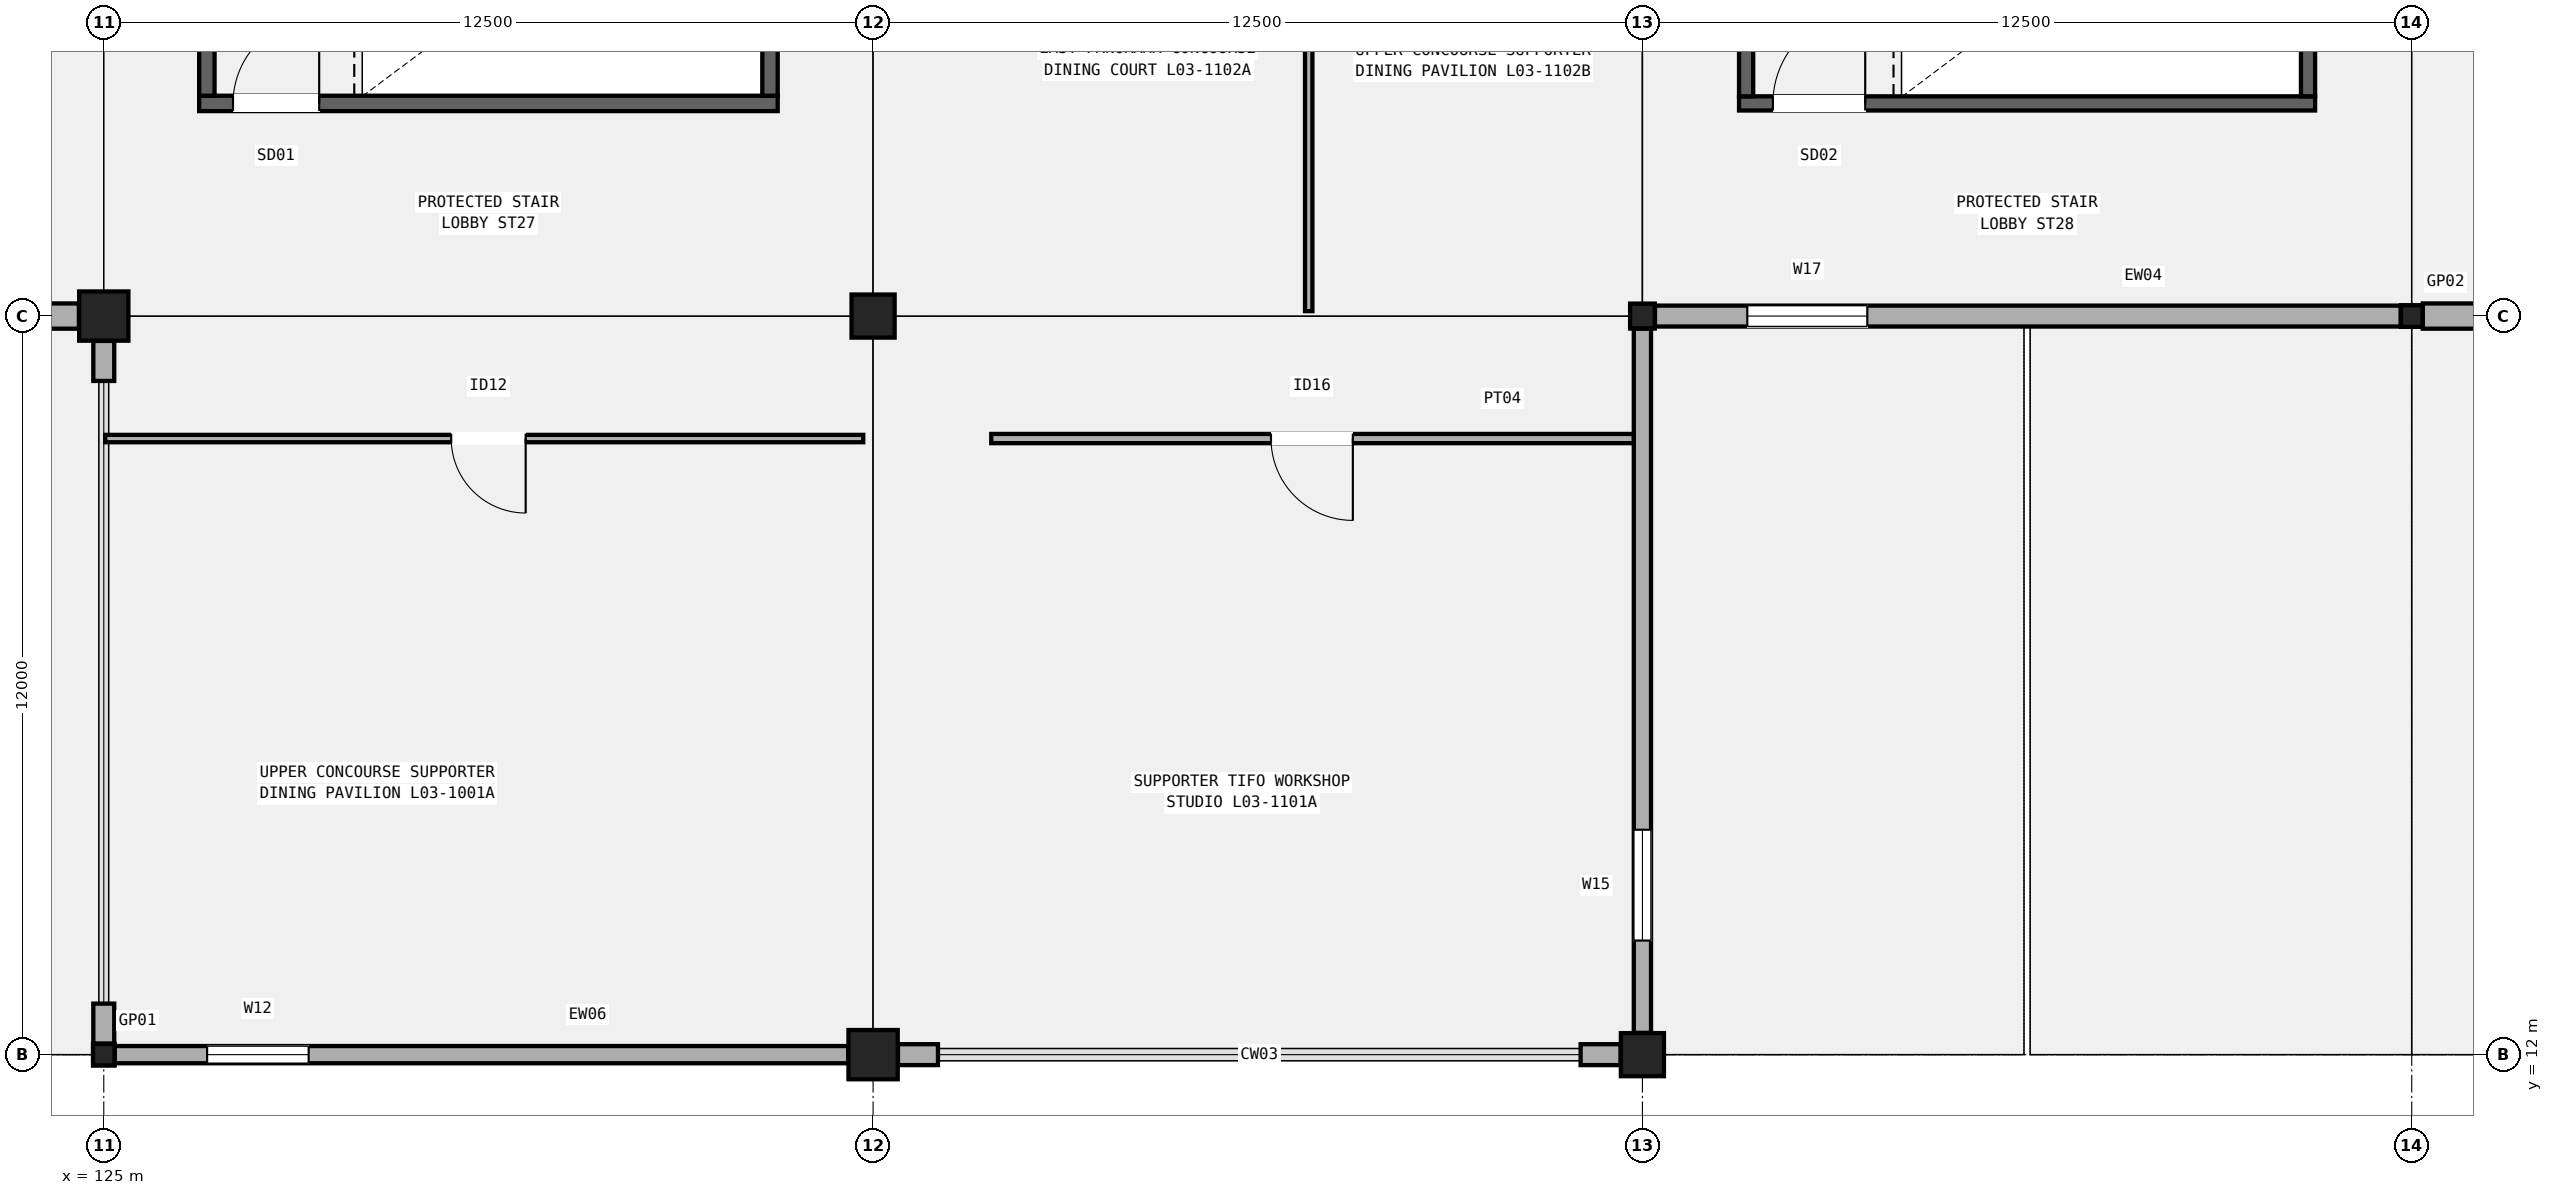
"""IFC4 building model, lengths in metres.
Left out: names, types, materials, properties, quantities, classifications, styles, units other than length and angle.
Written with IfcOpenShell. Run it as: python <this file> out.ifc"""

import sys

from ifc_helpers import new_model, si_unit, direction, frame, frame_2d, origin, origin_2d, place, context, subcontext, project, spatial, rectangle, hollow_rectangle, extrude, element, fill, save


model = new_model("IFC4")
c1 = context("Model", 3, precision=1e-05, world=origin(), true_north=direction((0.0, 1.0)))
c2 = subcontext(c1, "Body", "Model", "MODEL_VIEW")
j1 = project(units=[si_unit("LENGTHUNIT", "METRE"), si_unit("PLANEANGLEUNIT", "RADIAN")], contexts=[c1])
p1 = place(None, origin())
s1 = spatial("IfcSite", under=j1, at=p1, CompositionType="ELEMENT")
p2 = place(p1, origin())
s2 = spatial("IfcBuilding", under=s1, at=p2, CompositionType="ELEMENT")
p3 = place(p2, frame((0.0, 0.0, 15.3)))
s3 = spatial("IfcBuildingStorey", under=s2, at=p3, CompositionType="ELEMENT", Elevation=15.3)
p4 = place(p3, frame((125.0, 12.0, 0.0), z_axis=(0.0, 0.0, 1.0), x_axis=(1.0, 0.0, 0.0)))
e1 = element("IfcColumn", 1, at=p4, inside=s3, PredefinedType="COLUMN", context=c2, shape_type="SweptSolid", body=[
    extrude(hollow_rectangle(XDim=0.35, YDim=0.35, WallThickness=0.016, InnerFilletRadius=0.016, OuterFilletRadius=0.032, at=origin_2d()), origin(), (0.0, 0.0, 1.0), 5.1),
])
for number, where, z_axis, x_axis in (
    (2, (125.0, 24.0, 0.0), (0.0, 0.0, 1.0), (1.0, 0.0, 0.0)),
    (3, (137.5, 12.0, 0.0), (0.0, 0.0, 1.0), (1.0, 0.0, 0.0)),
):
    element("IfcColumn", number, at=place(p3, frame(where, z_axis=z_axis, x_axis=x_axis)), inside=s3, PredefinedType="COLUMN", context=c2, shape_type="SweptSolid", body=[
        extrude(rectangle(XDim=0.8, YDim=0.8, at=origin_2d()), origin(), (0.0, 0.0, 1.0), 5.1),
    ])
for number, where, z_axis, x_axis in (
    (4, (137.5, 24.0, 0.0), (0.0, 0.0, 1.0), (1.0, 0.0, 0.0)),
    (5, (150.0, 12.0, 0.0), (0.0, 0.0, 1.0), (1.0, 0.0, 0.0)),
):
    element("IfcColumn", number, at=place(p3, frame(where, z_axis=z_axis, x_axis=x_axis)), inside=s3, PredefinedType="COLUMN", context=c2, shape_type="SweptSolid", body=[
        extrude(rectangle(XDim=0.7, YDim=0.7, at=origin_2d()), origin(), (0.0, 0.0, 1.0), 5.1),
    ])
p5 = place(p3, frame((150.0, 24.0, 0.0), z_axis=(0.0, 0.0, 1.0), x_axis=(1.0, 0.0, 0.0)))
e6 = element("IfcColumn", 6, at=p5, inside=s3, PredefinedType="COLUMN", context=c2, shape_type="SweptSolid", body=[
    extrude(hollow_rectangle(XDim=0.4, YDim=0.4, WallThickness=0.016, InnerFilletRadius=0.016, OuterFilletRadius=0.032, at=origin_2d()), origin(), (0.0, 0.0, 1.0), 5.1),
])
p6 = place(p3, frame((162.5, 24.0, 0.0), z_axis=(0.0, 0.0, 1.0), x_axis=(1.0, 0.0, 0.0)))
e7 = element("IfcColumn", 7, at=p6, inside=s3, PredefinedType="COLUMN", context=c2, shape_type="SweptSolid", body=[
    extrude(hollow_rectangle(XDim=0.35, YDim=0.35, WallThickness=0.016, InnerFilletRadius=0.016, OuterFilletRadius=0.032, at=origin_2d()), origin(), (0.0, 0.0, 1.0), 5.1),
])
p7 = place(p3, frame((112.179, 24.0, 0.0), z_axis=(0.0, 0.0, 1.0), x_axis=(1.0, 0.0, 0.0)))
e8 = element("IfcWall", 8, at=p7, inside=s3, PredefinedType="SOLIDWALL", context=c2, shape_type="SweptSolid", body=[
    extrude(rectangle(XDim=12.417, YDim=0.41, at=frame_2d((6.208, 0.0))), origin(), (0.0, 0.0, 1.0), 4.172),
])
p8 = place(p7, frame((1.5, 0.0, 0.95)))
e9 = element("IfcOpeningElement", 9, at=p8, cuts=e8, PredefinedType="OPENING", context=c2, shape_type="SweptSolid", body=[
    extrude(rectangle(XDim=1.5, YDim=1.8, at=frame_2d((0.75, 0.9))), frame((0.0, 0.215, 0.0), z_axis=(0.0, -1.0, 0.0), x_axis=(1.0, 0.0, 0.0)), (0.0, 0.0, 1.0), 0.43),
])
p9 = place(p3, frame((125.179, 12.0, 0.0), z_axis=(0.0, 0.0, 1.0), x_axis=(1.0, 0.0, 0.0)))
e10 = element("IfcWall", 10, at=p9, inside=s3, PredefinedType="SOLIDWALL", context=c2, shape_type="SweptSolid", body=[
    extrude(rectangle(XDim=11.917, YDim=0.28, at=frame_2d((5.958, 0.0))), origin(), (0.0, 0.0, 1.0), 4.172),
])
p10 = place(p9, frame((1.5, 0.0, 0.95)))
e11 = element("IfcOpeningElement", 11, at=p10, cuts=e10, PredefinedType="OPENING", context=c2, shape_type="SweptSolid", body=[
    extrude(rectangle(XDim=1.65, YDim=2.45, at=frame_2d((0.825, 1.225))), frame((0.0, 0.15, 0.0), z_axis=(0.0, -1.0, 0.0), x_axis=(1.0, 0.0, 0.0)), (0.0, 0.0, 1.0), 0.3),
])
p11 = place(p3, frame((125.0, 12.179, 0.0), z_axis=(0.0, 0.0, 1.0), x_axis=(0.0, 1.0, 0.0)))
e12 = element("IfcWall", 12, at=p11, inside=s3, PredefinedType="SOLIDWALL", context=c2, shape_type="SweptSolid", body=[
    extrude(rectangle(XDim=0.65, YDim=0.34, at=frame_2d((0.325, 0.0))), origin(), (0.0, 0.0, 1.0), 4.172),
])
p12 = place(p3, frame((125.0, 22.946, 0.0), z_axis=(0.0, 0.0, 1.0), x_axis=(0.0, 1.0, 0.0)))
e13 = element("IfcWall", 13, at=p12, inside=s3, PredefinedType="SOLIDWALL", context=c2, shape_type="SweptSolid", body=[
    extrude(rectangle(XDim=0.65, YDim=0.34, at=frame_2d((0.325, 0.0))), origin(), (0.0, 0.0, 1.0), 4.172),
])
for number, where, z_axis, x_axis in (
    (14, (137.904, 12.0, 0.0), (0.0, 0.0, 1.0), (1.0, 0.0, 0.0)),
    (15, (148.996, 12.0, 0.0), (0.0, 0.0, 1.0), (1.0, 0.0, 0.0)),
):
    element("IfcWall", number, at=place(p3, frame(where, z_axis=z_axis, x_axis=x_axis)), inside=s3, PredefinedType="SOLIDWALL", context=c2, shape_type="SweptSolid", body=[
        extrude(rectangle(XDim=0.65, YDim=0.34, at=frame_2d((0.325, 0.0))), origin(), (0.0, 0.0, 1.0), 4.06),
    ])
p13 = place(p3, frame((150.0, 12.354, 0.0), z_axis=(0.0, 0.0, 1.0), x_axis=(0.0, 1.0, 0.0)))
e16 = element("IfcWall", 16, at=p13, inside=s3, PredefinedType="SOLIDWALL", context=c2, shape_type="SweptSolid", body=[
    extrude(rectangle(XDim=11.442, YDim=0.28, at=frame_2d((5.721, 0.0))), origin(), (0.0, 0.0, 1.0), 4.16),
])
p14 = place(p13, frame((1.5, 0.0, 0.95)))
e17 = element("IfcOpeningElement", 17, at=p14, cuts=e16, PredefinedType="OPENING", context=c2, shape_type="SweptSolid", body=[
    extrude(rectangle(XDim=1.8, YDim=2.55, at=frame_2d((0.9, 1.275))), frame((0.0, 0.15, 0.0), z_axis=(0.0, -1.0, 0.0), x_axis=(1.0, 0.0, 0.0)), (0.0, 0.0, 1.0), 0.3),
])
p15 = place(p3, frame((150.204, 24.0, 0.0), z_axis=(0.0, 0.0, 1.0), x_axis=(1.0, 0.0, 0.0)))
e18 = element("IfcWall", 18, at=p15, inside=s3, PredefinedType="SOLIDWALL", context=c2, shape_type="SweptSolid", body=[
    extrude(rectangle(XDim=12.117, YDim=0.34, at=frame_2d((6.059, 0.0))), origin(), (0.0, 0.0, 1.0), 4.172),
])
p16 = place(p15, frame((1.5, 0.0, 0.95)))
e19 = element("IfcOpeningElement", 19, at=p16, cuts=e18, PredefinedType="OPENING", context=c2, shape_type="SweptSolid", body=[
    extrude(rectangle(XDim=1.95, YDim=2.35, at=frame_2d((0.975, 1.175))), frame((0.0, 0.18, 0.0), z_axis=(0.0, -1.0, 0.0), x_axis=(1.0, 0.0, 0.0)), (0.0, 0.0, 1.0), 0.36),
])
p17 = place(p3, frame((162.679, 24.0, 0.0), z_axis=(0.0, 0.0, 1.0), x_axis=(1.0, 0.0, 0.0)))
e20 = element("IfcWall", 20, at=p17, inside=s3, PredefinedType="SOLIDWALL", context=c2, shape_type="SweptSolid", body=[
    extrude(rectangle(XDim=11.917, YDim=0.41, at=frame_2d((5.958, 0.0))), origin(), (0.0, 0.0, 1.0), 4.06),
])
p18 = place(p17, frame((1.5, 0.0, 0.95)))
e21 = element("IfcOpeningElement", 21, at=p18, cuts=e20, PredefinedType="OPENING", context=c2, shape_type="SweptSolid", body=[
    extrude(rectangle(XDim=2.1, YDim=2.25, at=frame_2d((1.05, 1.125))), frame((0.0, 0.215, 0.0), z_axis=(0.0, -1.0, 0.0), x_axis=(1.0, 0.0, 0.0)), (0.0, 0.0, 1.0), 0.43),
])
p19 = place(p3, frame((126.55, 27.455, 0.0), z_axis=(0.0, 0.0, 1.0), x_axis=(1.0, 0.0, 0.0)))
e22 = element("IfcWall", 22, at=p19, inside=s3, PredefinedType="SHEAR", context=c2, shape_type="SweptSolid", body=[
    extrude(rectangle(XDim=9.4, YDim=0.25, at=frame_2d((4.7, 0.0))), origin(), (0.0, 0.0, 1.0), 4.86),
])
p20 = place(p19, frame((0.55, 0.0, 0.0)))
e23 = element("IfcOpeningElement", 23, at=p20, cuts=e22, PredefinedType="OPENING", context=c2, shape_type="SweptSolid", body=[
    extrude(rectangle(XDim=1.4, YDim=2.15, at=frame_2d((0.7, 1.075))), frame((0.0, 0.135, 0.0), z_axis=(0.0, -1.0, 0.0), x_axis=(1.0, 0.0, 0.0)), (0.0, 0.0, 1.0), 0.27),
])
for number, where, z_axis, x_axis in (
    (24, (126.675, 27.58, 0.0), (0.0, 0.0, 1.0), (0.0, 1.0, 0.0)),
    (25, (135.825, 27.58, 0.0), (0.0, 0.0, 1.0), (0.0, 1.0, 0.0)),
):
    element("IfcWall", number, at=place(p3, frame(where, z_axis=z_axis, x_axis=x_axis)), inside=s3, PredefinedType="SHEAR", context=c2, shape_type="SweptSolid", body=[
        extrude(rectangle(XDim=4.84, YDim=0.25, at=frame_2d((2.42, 0.0))), origin(), (0.0, 0.0, 1.0), 4.86),
    ])
p21 = place(p3, frame((151.57, 27.455, 0.0), z_axis=(0.0, 0.0, 1.0), x_axis=(1.0, 0.0, 0.0)))
e26 = element("IfcWall", 26, at=p21, inside=s3, PredefinedType="SHEAR", context=c2, shape_type="SweptSolid", body=[
    extrude(rectangle(XDim=9.36, YDim=0.23, at=frame_2d((4.68, 0.0))), origin(), (0.0, 0.0, 1.0), 4.86),
])
p22 = place(p21, frame((0.55, 0.0, 0.0)))
e27 = element("IfcOpeningElement", 27, at=p22, cuts=e26, PredefinedType="OPENING", context=c2, shape_type="SweptSolid", body=[
    extrude(rectangle(XDim=1.5, YDim=2.2, at=frame_2d((0.75, 1.1))), frame((0.0, 0.125, 0.0), z_axis=(0.0, -1.0, 0.0), x_axis=(1.0, 0.0, 0.0)), (0.0, 0.0, 1.0), 0.25),
])
for number, where, z_axis, x_axis in (
    (28, (151.685, 27.57, 0.0), (0.0, 0.0, 1.0), (0.0, 1.0, 0.0)),
    (29, (160.815, 27.57, 0.0), (0.0, 0.0, 1.0), (0.0, 1.0, 0.0)),
):
    element("IfcWall", number, at=place(p3, frame(where, z_axis=z_axis, x_axis=x_axis)), inside=s3, PredefinedType="SHEAR", context=c2, shape_type="SweptSolid", body=[
        extrude(rectangle(XDim=4.86, YDim=0.23, at=frame_2d((2.43, 0.0))), origin(), (0.0, 0.0, 1.0), 4.86),
    ])
p23 = place(p3, frame((125.024, 22.01, 0.0), z_axis=(0.0, 0.0, 1.0), x_axis=(1.0, 0.0, 0.0)))
e30 = element("IfcWall", 30, at=p23, inside=s3, PredefinedType="PARTITIONING", context=c2, shape_type="SweptSolid", body=[
    extrude(rectangle(XDim=12.316, YDim=0.12, at=frame_2d((6.158, 0.0))), origin(), (0.0, 0.0, 1.0), 4.22),
])
p24 = place(p23, frame((6.831, 0.0, 0.0), z_axis=(0.0, 0.0, 1.0), x_axis=(-1.0, 0.0, 0.0)))
e31 = element("IfcOpeningElement", 31, at=p24, cuts=e30, PredefinedType="OPENING", context=c2, shape_type="SweptSolid", body=[
    extrude(rectangle(XDim=1.21, YDim=2.18, at=frame_2d((0.605, 1.09))), frame((0.0, 0.07, 0.0), z_axis=(0.0, -1.0, 0.0), x_axis=(1.0, 0.0, 0.0)), (0.0, 0.0, 1.0), 0.14),
])
p25 = place(p3, frame((139.42, 22.01, 0.0), z_axis=(0.0, 0.0, 1.0), x_axis=(1.0, 0.0, 0.0)))
e32 = element("IfcWall", 32, at=p25, inside=s3, PredefinedType="PARTITIONING", context=c2, shape_type="SweptSolid", body=[
    extrude(rectangle(XDim=10.438, YDim=0.15, at=frame_2d((5.219, 0.0))), origin(), (0.0, 0.0, 1.0), 4.22),
])
p26 = place(p25, frame((5.875, 0.0, 0.0), z_axis=(0.0, 0.0, 1.0), x_axis=(-1.0, 0.0, 0.0)))
e33 = element("IfcOpeningElement", 33, at=p26, cuts=e32, PredefinedType="OPENING", context=c2, shape_type="SweptSolid", body=[
    extrude(rectangle(XDim=1.33, YDim=2.22, at=frame_2d((0.665, 1.11))), frame((0.0, 0.085, 0.0), z_axis=(0.0, -1.0, 0.0), x_axis=(1.0, 0.0, 0.0)), (0.0, 0.0, 1.0), 0.17),
])
p27 = place(p3, frame((144.578, 24.08, 0.0), z_axis=(0.0, 0.0, 1.0), x_axis=(0.0, 1.0, 0.0)))
e34 = element("IfcWall", 34, at=p27, inside=s3, PredefinedType="PARTITIONING", context=c2, shape_type="SweptSolid", body=[
    extrude(rectangle(XDim=9.87, YDim=0.12, at=frame_2d((4.935, 0.0))), origin(), (0.0, 0.0, 1.0), 2.77),
])
p28 = place(p10, origin())
e35 = element("IfcWindow", 35, at=p28, inside=s3, PartitioningType="SINGLE_PANEL", PredefinedType="WINDOW", context=c2, shape_type="SweptSolid", body=[
    extrude(rectangle(XDim=1.65, YDim=2.45, at=frame_2d((0.825, 1.225))), frame((0.0, 0.03, 0.0), z_axis=(0.0, -1.0, 0.0), x_axis=(1.0, 0.0, 0.0)), (0.0, 0.0, 1.0), 0.06),
])
fill(e11, e35)
p29 = place(p14, origin())
e36 = element("IfcWindow", 36, at=p29, inside=s3, PartitioningType="SINGLE_PANEL", PredefinedType="WINDOW", context=c2, shape_type="SweptSolid", body=[
    extrude(rectangle(XDim=1.8, YDim=2.55, at=frame_2d((0.9, 1.275))), frame((0.0, 0.03, 0.0), z_axis=(0.0, -1.0, 0.0), x_axis=(1.0, 0.0, 0.0)), (0.0, 0.0, 1.0), 0.06),
])
fill(e17, e36)
p30 = place(p16, origin())
e37 = element("IfcWindow", 37, at=p30, inside=s3, PartitioningType="SINGLE_PANEL", PredefinedType="WINDOW", context=c2, shape_type="SweptSolid", body=[
    extrude(rectangle(XDim=1.95, YDim=2.35, at=frame_2d((0.975, 1.175))), frame((0.0, 0.03, 0.0), z_axis=(0.0, -1.0, 0.0), x_axis=(1.0, 0.0, 0.0)), (0.0, 0.0, 1.0), 0.06),
])
fill(e19, e37)
p31 = place(p20, origin())
e38 = element("IfcDoor", 38, at=p31, inside=s3, OperationType="SINGLE_SWING_RIGHT", PredefinedType="DOOR", context=c2, shape_type="SweptSolid", body=[
    extrude(rectangle(XDim=1.4, YDim=2.15, at=frame_2d((0.7, 1.075))), frame((0.0, 0.025, 0.0), z_axis=(0.0, -1.0, 0.0), x_axis=(1.0, 0.0, 0.0)), (0.0, 0.0, 1.0), 0.05),
])
fill(e23, e38)
p32 = place(p22, origin())
e39 = element("IfcDoor", 39, at=p32, inside=s3, OperationType="SINGLE_SWING_RIGHT", PredefinedType="DOOR", context=c2, shape_type="SweptSolid", body=[
    extrude(rectangle(XDim=1.5, YDim=2.2, at=frame_2d((0.75, 1.1))), frame((0.0, 0.025, 0.0), z_axis=(0.0, -1.0, 0.0), x_axis=(1.0, 0.0, 0.0)), (0.0, 0.0, 1.0), 0.05),
])
fill(e27, e39)
p33 = place(p24, origin())
e40 = element("IfcDoor", 40, at=p33, inside=s3, OperationType="SINGLE_SWING_LEFT", PredefinedType="DOOR", context=c2, shape_type="SweptSolid", body=[
    extrude(rectangle(XDim=1.21, YDim=2.18, at=frame_2d((0.605, 1.09))), frame((0.0, 0.025, 0.0), z_axis=(0.0, -1.0, 0.0), x_axis=(1.0, 0.0, 0.0)), (0.0, 0.0, 1.0), 0.05),
])
fill(e31, e40)
p34 = place(p26, origin())
e41 = element("IfcDoor", 41, at=p34, inside=s3, OperationType="SINGLE_SWING_LEFT", PredefinedType="DOOR", context=c2, shape_type="SweptSolid", body=[
    extrude(rectangle(XDim=1.33, YDim=2.22, at=frame_2d((0.665, 1.11))), frame((0.0, 0.025, 0.0), z_axis=(0.0, -1.0, 0.0), x_axis=(1.0, 0.0, 0.0)), (0.0, 0.0, 1.0), 0.05),
])
fill(e33, e41)
save(model, sys.argv[1])
